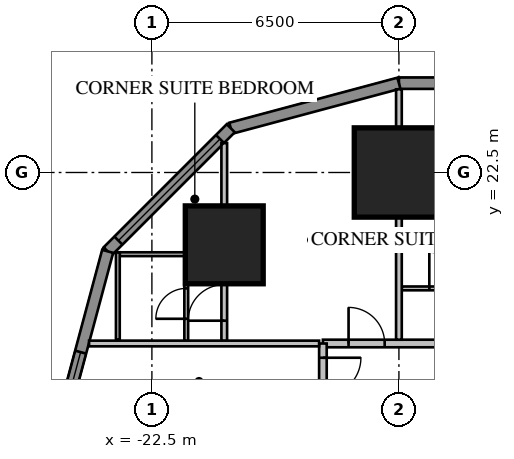
"""IFC4 building model, lengths in metres.
Left out: names, types, materials, properties, quantities, classifications, styles, units other than length and angle.
Written with IfcOpenShell. Run it as: python <this file> out.ifc"""

import sys

from ifc_helpers import new_model, si_unit, direction, frame, frame_2d, origin, origin_2d, place, context, subcontext, project, spatial, rectangle, extrude, element, fill, save


model = new_model("IFC4")
c1 = context("Model", 3, precision=1e-05, world=origin(), true_north=direction((0.0, 1.0)))
c2 = subcontext(c1, "Body", "Model", "MODEL_VIEW")
j1 = project(units=[si_unit("LENGTHUNIT", "METRE"), si_unit("PLANEANGLEUNIT", "RADIAN")], contexts=[c1])
p1 = place(None, origin())
s1 = spatial("IfcSite", under=j1, at=p1, CompositionType="ELEMENT")
p2 = place(p1, origin())
s2 = spatial("IfcBuilding", under=s1, at=p2, CompositionType="ELEMENT")
p3 = place(p2, frame((0.0, 0.0, 31.4)))
s3 = spatial("IfcBuildingStorey", under=s2, at=p3, CompositionType="ELEMENT", Elevation=31.4)
p4 = place(p3, frame((-16.0, 22.5, 0.0), z_axis=(0.0, 0.0, 1.0), x_axis=(1.0, 0.0, 0.0)))
e1 = element("IfcColumn", 1, at=p4, inside=s3, PredefinedType="COLUMN", context=c2, shape_type="SweptSolid", body=[
    extrude(rectangle(XDim=2.35, YDim=2.35, at=origin_2d()), origin(), (0.0, 0.0, 1.0), 3.85),
])
p5 = place(p3, frame((-20.596, 20.596, 0.0), z_axis=(0.0, 0.0, 1.0), x_axis=(1.0, 0.0, 0.0)))
e2 = element("IfcColumn", 2, at=p5, inside=s3, PredefinedType="COLUMN", context=c2, shape_type="SweptSolid", body=[
    extrude(rectangle(XDim=2.05, YDim=2.05, at=origin_2d()), origin(), (0.0, 0.0, 1.0), 3.85),
])
p6 = place(p3, frame((16.0, 24.85, 0.0), z_axis=(0.0, 0.0, 1.0), x_axis=(-1.0, 0.0, 0.0)))
e3 = element("IfcWall", 3, at=p6, inside=s3, PredefinedType="SOLIDWALL", context=c2, shape_type="SweptSolid", body=[
    extrude(rectangle(XDim=32.0, YDim=0.3, at=frame_2d((16.0, 0.0))), origin(), (0.0, 0.0, 1.0), 3.65),
])
p7 = place(p6, frame((1.2, 0.0, 0.75)))
e4 = element("IfcOpeningElement", 4, at=p7, cuts=e3, PredefinedType="OPENING", context=c2, shape_type="SweptSolid", body=[
    extrude(rectangle(XDim=1.6, YDim=1.8, at=frame_2d((0.8, 0.9))), frame((0.0, 0.17, 0.0), z_axis=(0.0, -1.0, 0.0), x_axis=(1.0, 0.0, 0.0)), (0.0, 0.0, 1.0), 0.34),
])
p8 = place(p6, frame((5.2, 0.0, 0.75)))
e5 = element("IfcOpeningElement", 5, at=p8, cuts=e3, PredefinedType="OPENING", context=c2, shape_type="SweptSolid", body=[
    extrude(rectangle(XDim=1.6, YDim=1.8, at=frame_2d((0.8, 0.9))), frame((0.0, 0.17, 0.0), z_axis=(0.0, -1.0, 0.0), x_axis=(1.0, 0.0, 0.0)), (0.0, 0.0, 1.0), 0.34),
])
p9 = place(p6, frame((17.2, 0.0, 0.75)))
e6 = element("IfcOpeningElement", 6, at=p9, cuts=e3, PredefinedType="OPENING", context=c2, shape_type="SweptSolid", body=[
    extrude(rectangle(XDim=1.6, YDim=1.8, at=frame_2d((0.8, 0.9))), frame((0.0, 0.17, 0.0), z_axis=(0.0, -1.0, 0.0), x_axis=(1.0, 0.0, 0.0)), (0.0, 0.0, 1.0), 0.34),
])
p10 = place(p6, frame((21.2, 0.0, 0.75)))
e7 = element("IfcOpeningElement", 7, at=p10, cuts=e3, PredefinedType="OPENING", context=c2, shape_type="SweptSolid", body=[
    extrude(rectangle(XDim=1.6, YDim=1.8, at=frame_2d((0.8, 0.9))), frame((0.0, 0.17, 0.0), z_axis=(0.0, -1.0, 0.0), x_axis=(1.0, 0.0, 0.0)), (0.0, 0.0, 1.0), 0.34),
])
p11 = place(p6, frame((25.2, 0.0, 0.75)))
e8 = element("IfcOpeningElement", 8, at=p11, cuts=e3, PredefinedType="OPENING", context=c2, shape_type="SweptSolid", body=[
    extrude(rectangle(XDim=1.6, YDim=1.8, at=frame_2d((0.8, 0.9))), frame((0.0, 0.17, 0.0), z_axis=(0.0, -1.0, 0.0), x_axis=(1.0, 0.0, 0.0)), (0.0, 0.0, 1.0), 0.34),
])
p12 = place(p6, frame((29.2, 0.0, 0.75)))
e9 = element("IfcOpeningElement", 9, at=p12, cuts=e3, PredefinedType="OPENING", context=c2, shape_type="SweptSolid", body=[
    extrude(rectangle(XDim=1.6, YDim=1.8, at=frame_2d((0.8, 0.9))), frame((0.0, 0.17, 0.0), z_axis=(0.0, -1.0, 0.0), x_axis=(1.0, 0.0, 0.0)), (0.0, 0.0, 1.0), 0.34),
])
p13 = place(p6, frame((8.8, 0.0, 0.75)))
e10 = element("IfcOpeningElement", 10, at=p13, cuts=e3, PredefinedType="OPENING", context=c2, shape_type="SweptSolid", body=[
    extrude(rectangle(XDim=2.4, YDim=1.8, at=frame_2d((1.2, 0.9))), frame((0.0, 0.17, 0.0), z_axis=(0.0, -1.0, 0.0), x_axis=(1.0, 0.0, 0.0)), (0.0, 0.0, 1.0), 0.34),
])
p14 = place(p6, frame((13.812, 0.0, 0.0)))
e11 = element("IfcOpeningElement", 11, at=p14, cuts=e3, PredefinedType="OPENING", context=c2, shape_type="SweptSolid", body=[
    extrude(rectangle(XDim=1.0, YDim=2.4, at=frame_2d((0.5, 1.2))), frame((0.0, 0.17, 0.0), z_axis=(0.0, -1.0, 0.0), x_axis=(1.0, 0.0, 0.0)), (0.0, 0.0, 1.0), 0.34),
])
p15 = place(p3, frame((-16.0, 24.85, 0.0), z_axis=(0.0, 0.0, 1.0), x_axis=(-0.965920218567, -0.258839972501, 0.0)))
e12 = element("IfcWall", 12, at=p15, inside=s3, PredefinedType="SOLIDWALL", context=c2, shape_type="SweptSolid", body=[
    extrude(rectangle(XDim=4.581, YDim=0.3, at=frame_2d((2.291, 0.0))), origin(), (0.0, 0.0, 1.0), 3.65),
])
p16 = place(p3, frame((-20.425, 23.664, 0.0), z_axis=(0.0, 0.0, 1.0), x_axis=(-0.707106781187, -0.707106781187, 0.0)))
e13 = element("IfcWall", 13, at=p16, inside=s3, PredefinedType="SOLIDWALL", context=c2, shape_type="SweptSolid", body=[
    extrude(rectangle(XDim=4.581, YDim=0.3, at=frame_2d((2.291, 0.0))), origin(), (0.0, 0.0, 1.0), 3.65),
])
p17 = place(p16, frame((0.4, 0.0, 0.75)))
e14 = element("IfcOpeningElement", 14, at=p17, cuts=e13, PredefinedType="OPENING", context=c2, shape_type="SweptSolid", body=[
    extrude(rectangle(XDim=3.781, YDim=1.8, at=frame_2d((1.891, 0.9))), frame((0.0, 0.17, 0.0), z_axis=(0.0, -1.0, 0.0), x_axis=(1.0, 0.0, 0.0)), (0.0, 0.0, 1.0), 0.34),
])
p18 = place(p3, frame((-23.664, 20.425, 0.0), z_axis=(0.0, 0.0, 1.0), x_axis=(-0.258839972501, -0.965920218567, 0.0)))
e15 = element("IfcWall", 15, at=p18, inside=s3, PredefinedType="SOLIDWALL", context=c2, shape_type="SweptSolid", body=[
    extrude(rectangle(XDim=4.581, YDim=0.3, at=frame_2d((2.291, 0.0))), origin(), (0.0, 0.0, 1.0), 3.65),
])
p19 = place(p18, frame((2.746, 0.0, 0.75)))
e16 = element("IfcOpeningElement", 16, at=p19, cuts=e15, PredefinedType="OPENING", context=c2, shape_type="SweptSolid", body=[
    extrude(rectangle(XDim=1.6, YDim=1.8, at=frame_2d((0.8, 0.9))), frame((0.0, 0.17, 0.0), z_axis=(0.0, -1.0, 0.0), x_axis=(1.0, 0.0, 0.0)), (0.0, 0.0, 1.0), 0.34),
])
p20 = place(p3, frame((18.0, 18.0, 0.0), z_axis=(0.0, 0.0, 1.0), x_axis=(-1.0, 0.0, 0.0)))
e17 = element("IfcWall", 17, at=p20, inside=s3, PredefinedType="PARTITIONING", context=c2, shape_type="SweptSolid", body=[
    extrude(rectangle(XDim=36.0, YDim=0.2, at=frame_2d((18.0, 0.0))), origin(), (0.0, 0.0, 1.0), 3.65),
])
p21 = place(p20, frame((10.4, 0.0, 0.0)))
e18 = element("IfcOpeningElement", 18, at=p21, cuts=e17, PredefinedType="OPENING", context=c2, shape_type="SweptSolid", body=[
    extrude(rectangle(XDim=1.0, YDim=2.1, at=frame_2d((0.5, 1.05))), frame((0.0, 0.12, 0.0), z_axis=(0.0, -1.0, 0.0), x_axis=(1.0, 0.0, 0.0)), (0.0, 0.0, 1.0), 0.24),
])
p22 = place(p20, frame((0.375, 0.0, 0.0)))
e19 = element("IfcOpeningElement", 19, at=p22, cuts=e17, PredefinedType="OPENING", context=c2, shape_type="SweptSolid", body=[
    extrude(rectangle(XDim=1.0, YDim=2.1, at=frame_2d((0.5, 1.05))), frame((0.0, 0.12, 0.0), z_axis=(0.0, -1.0, 0.0), x_axis=(1.0, 0.0, 0.0)), (0.0, 0.0, 1.0), 0.24),
])
p23 = place(p20, frame((34.375, 0.0, 0.0)))
e20 = element("IfcOpeningElement", 20, at=p23, cuts=e17, PredefinedType="OPENING", context=c2, shape_type="SweptSolid", body=[
    extrude(rectangle(XDim=0.95, YDim=2.1, at=frame_2d((0.475, 1.05))), frame((0.0, 0.12, 0.0), z_axis=(0.0, -1.0, 0.0), x_axis=(1.0, 0.0, 0.0)), (0.0, 0.0, 1.0), 0.24),
])
p24 = place(p3, frame((15.925, 19.45, 0.0), z_axis=(0.0, 0.0, 1.0), x_axis=(-1.0, 0.0, 0.0)))
e21 = element("IfcWall", 21, at=p24, inside=s3, PredefinedType="PARTITIONING", context=c2, shape_type="SweptSolid", body=[
    extrude(rectangle(XDim=31.85, YDim=0.1, at=frame_2d((15.925, 0.0))), origin(), (0.0, 0.0, 1.0), 3.65),
])
p25 = place(p24, frame((10.125, 0.0, 0.0)))
e22 = element("IfcOpeningElement", 22, at=p25, cuts=e21, PredefinedType="OPENING", context=c2, shape_type="SweptSolid", body=[
    extrude(rectangle(XDim=1.0, YDim=2.1, at=frame_2d((0.5, 1.05))), frame((0.0, 0.07, 0.0), z_axis=(0.0, -1.0, 0.0), x_axis=(1.0, 0.0, 0.0)), (0.0, 0.0, 1.0), 0.14),
])
p26 = place(p24, frame((8.3, 0.0, 0.0)))
e23 = element("IfcOpeningElement", 23, at=p26, cuts=e21, PredefinedType="OPENING", context=c2, shape_type="SweptSolid", body=[
    extrude(rectangle(XDim=0.8, YDim=2.1, at=frame_2d((0.4, 1.05))), frame((0.0, 0.07, 0.0), z_axis=(0.0, -1.0, 0.0), x_axis=(1.0, 0.0, 0.0)), (0.0, 0.0, 1.0), 0.14),
])
p27 = place(p24, frame((0.3, 0.0, 0.0)))
e24 = element("IfcOpeningElement", 24, at=p27, cuts=e21, PredefinedType="OPENING", context=c2, shape_type="SweptSolid", body=[
    extrude(rectangle(XDim=0.95, YDim=2.1, at=frame_2d((0.475, 1.05))), frame((0.0, 0.07, 0.0), z_axis=(0.0, -1.0, 0.0), x_axis=(1.0, 0.0, 0.0)), (0.0, 0.0, 1.0), 0.14),
])
p28 = place(p24, frame((6.175, 0.0, 0.0)))
e25 = element("IfcOpeningElement", 25, at=p28, cuts=e21, PredefinedType="OPENING", context=c2, shape_type="SweptSolid", body=[
    extrude(rectangle(XDim=0.95, YDim=2.1, at=frame_2d((0.475, 1.05))), frame((0.0, 0.07, 0.0), z_axis=(0.0, -1.0, 0.0), x_axis=(1.0, 0.0, 0.0)), (0.0, 0.0, 1.0), 0.14),
])
p29 = place(p24, frame((16.3, 0.0, 0.0)))
e26 = element("IfcOpeningElement", 26, at=p29, cuts=e21, PredefinedType="OPENING", context=c2, shape_type="SweptSolid", body=[
    extrude(rectangle(XDim=0.95, YDim=2.1, at=frame_2d((0.475, 1.05))), frame((0.0, 0.07, 0.0), z_axis=(0.0, -1.0, 0.0), x_axis=(1.0, 0.0, 0.0)), (0.0, 0.0, 1.0), 0.14),
])
p30 = place(p24, frame((22.175, 0.0, 0.0)))
e27 = element("IfcOpeningElement", 27, at=p30, cuts=e21, PredefinedType="OPENING", context=c2, shape_type="SweptSolid", body=[
    extrude(rectangle(XDim=0.95, YDim=2.1, at=frame_2d((0.475, 1.05))), frame((0.0, 0.07, 0.0), z_axis=(0.0, -1.0, 0.0), x_axis=(1.0, 0.0, 0.0)), (0.0, 0.0, 1.0), 0.14),
])
p31 = place(p24, frame((24.3, 0.0, 0.0)))
e28 = element("IfcOpeningElement", 28, at=p31, cuts=e21, PredefinedType="OPENING", context=c2, shape_type="SweptSolid", body=[
    extrude(rectangle(XDim=0.95, YDim=2.1, at=frame_2d((0.475, 1.05))), frame((0.0, 0.07, 0.0), z_axis=(0.0, -1.0, 0.0), x_axis=(1.0, 0.0, 0.0)), (0.0, 0.0, 1.0), 0.14),
])
p32 = place(p24, frame((30.175, 0.0, 0.0)))
e29 = element("IfcOpeningElement", 29, at=p32, cuts=e21, PredefinedType="OPENING", context=c2, shape_type="SweptSolid", body=[
    extrude(rectangle(XDim=0.95, YDim=2.1, at=frame_2d((0.475, 1.05))), frame((0.0, 0.07, 0.0), z_axis=(0.0, -1.0, 0.0), x_axis=(1.0, 0.0, 0.0)), (0.0, 0.0, 1.0), 0.14),
])
p33 = place(p3, frame((-16.0, 18.1, 0.0), z_axis=(0.0, 0.0, 1.0), x_axis=(0.0, 1.0, 0.0)))
e30 = element("IfcWall", 30, at=p33, inside=s3, PredefinedType="PARTITIONING", context=c2, shape_type="SweptSolid", body=[
    extrude(rectangle(XDim=6.589, YDim=0.15, at=frame_2d((3.295, 0.0))), origin(), (0.0, 0.0, 1.0), 3.65),
])
p34 = place(p3, frame((-21.596, 18.065, 0.0), z_axis=(0.0, 0.0, 1.0), x_axis=(0.0, 1.0, 0.0)))
e31 = element("IfcWall", 31, at=p34, inside=s3, PredefinedType="PARTITIONING", context=c2, shape_type="SweptSolid", body=[
    extrude(rectangle(XDim=2.335, YDim=0.1, at=frame_2d((1.167, 0.0))), origin(), (0.0, 0.0, 1.0), 3.65),
])
p35 = place(p34, frame((0.585, 0.0, 0.0)))
e32 = element("IfcOpeningElement", 32, at=p35, cuts=e31, PredefinedType="OPENING", context=c2, shape_type="SweptSolid", body=[
    extrude(rectangle(XDim=0.8, YDim=2.1, at=frame_2d((0.4, 1.05))), frame((0.0, 0.07, 0.0), z_axis=(0.0, -1.0, 0.0), x_axis=(1.0, 0.0, 0.0)), (0.0, 0.0, 1.0), 0.14),
])
p36 = place(p3, frame((-21.646, 20.35, 0.0), z_axis=(0.0, 0.0, 1.0), x_axis=(-1.0, 0.0, 0.0)))
e33 = element("IfcWall", 33, at=p36, inside=s3, PredefinedType="PARTITIONING", context=c2, shape_type="SweptSolid", body=[
    extrude(rectangle(XDim=1.7, YDim=0.1, at=frame_2d((0.85, 0.0))), origin(), (0.0, 0.0, 1.0), 3.65),
])
p37 = place(p3, frame((-23.396, 18.1, 0.0), z_axis=(0.0, 0.0, 1.0), x_axis=(0.0, 1.0, 0.0)))
e34 = element("IfcWall", 34, at=p37, inside=s3, PredefinedType="PARTITIONING", context=c2, shape_type="SweptSolid", body=[
    extrude(rectangle(XDim=2.3, YDim=0.1, at=frame_2d((1.15, 0.0))), origin(), (0.0, 0.0, 1.0), 3.65),
])
p38 = place(p3, frame((-20.596, 18.065, 0.0), z_axis=(0.0, 0.0, 1.0), x_axis=(0.0, 1.0, 0.0)))
e35 = element("IfcWall", 35, at=p38, inside=s3, PredefinedType="PARTITIONING", context=c2, shape_type="SweptSolid", body=[
    extrude(rectangle(XDim=5.209, YDim=0.15, at=frame_2d((2.604, 0.0))), origin(), (0.0, 0.0, 1.0), 3.65),
])
p39 = place(p38, frame((0.535, 0.0, 0.0)))
e36 = element("IfcOpeningElement", 36, at=p39, cuts=e35, PredefinedType="OPENING", context=c2, shape_type="SweptSolid", body=[
    extrude(rectangle(XDim=0.95, YDim=2.1, at=frame_2d((0.475, 1.05))), frame((0.0, 0.095, 0.0), z_axis=(0.0, -1.0, 0.0), x_axis=(1.0, 0.0, 0.0)), (0.0, 0.0, 1.0), 0.19),
])
p40 = place(p3, frame((-18.0, 18.0, 0.0), z_axis=(0.0, 0.0, 1.0), x_axis=(0.0, -1.0, 0.0)))
e37 = element("IfcWall", 37, at=p40, inside=s3, PredefinedType="PARTITIONING", context=c2, shape_type="SweptSolid", body=[
    extrude(rectangle(XDim=36.0, YDim=0.2, at=frame_2d((18.0, 0.0))), origin(), (0.0, 0.0, 1.0), 3.65),
])
p41 = place(p40, frame((10.4, 0.0, 0.0)))
e38 = element("IfcOpeningElement", 38, at=p41, cuts=e37, PredefinedType="OPENING", context=c2, shape_type="SweptSolid", body=[
    extrude(rectangle(XDim=1.0, YDim=2.1, at=frame_2d((0.5, 1.05))), frame((0.0, 0.12, 0.0), z_axis=(0.0, -1.0, 0.0), x_axis=(1.0, 0.0, 0.0)), (0.0, 0.0, 1.0), 0.24),
])
p42 = place(p40, frame((0.375, 0.0, 0.0)))
e39 = element("IfcOpeningElement", 39, at=p42, cuts=e37, PredefinedType="OPENING", context=c2, shape_type="SweptSolid", body=[
    extrude(rectangle(XDim=1.0, YDim=2.1, at=frame_2d((0.5, 1.05))), frame((0.0, 0.12, 0.0), z_axis=(0.0, -1.0, 0.0), x_axis=(1.0, 0.0, 0.0)), (0.0, 0.0, 1.0), 0.24),
])
p43 = place(p40, frame((34.375, 0.0, 0.0)))
e40 = element("IfcOpeningElement", 40, at=p43, cuts=e37, PredefinedType="OPENING", context=c2, shape_type="SweptSolid", body=[
    extrude(rectangle(XDim=0.95, YDim=2.1, at=frame_2d((0.475, 1.05))), frame((0.0, 0.12, 0.0), z_axis=(0.0, -1.0, 0.0), x_axis=(1.0, 0.0, 0.0)), (0.0, 0.0, 1.0), 0.24),
])
p44 = place(p3, frame((-18.1, 18.0, 0.0), z_axis=(0.0, 0.0, 1.0), x_axis=(-1.0, 0.0, 0.0)))
e41 = element("IfcWall", 41, at=p44, inside=s3, PredefinedType="PARTITIONING", context=c2, shape_type="SweptSolid", body=[
    extrude(rectangle(XDim=6.053, YDim=0.15, at=frame_2d((3.027, 0.0))), origin(), (0.0, 0.0, 1.0), 3.65),
])
p45 = place(p17, origin())
e42 = element("IfcWindow", 42, at=p45, inside=s3, PartitioningType="SINGLE_PANEL", PredefinedType="WINDOW", context=c2, shape_type="SweptSolid", body=[
    extrude(rectangle(XDim=3.781, YDim=1.8, at=frame_2d((1.891, 0.9))), frame((0.0, 0.03, 0.0), z_axis=(0.0, -1.0, 0.0), x_axis=(1.0, 0.0, 0.0)), (0.0, 0.0, 1.0), 0.06),
])
fill(e14, e42)
p46 = place(p19, origin())
e43 = element("IfcWindow", 43, at=p46, inside=s3, PartitioningType="SINGLE_PANEL", PredefinedType="WINDOW", context=c2, shape_type="SweptSolid", body=[
    extrude(rectangle(XDim=1.6, YDim=1.8, at=frame_2d((0.8, 0.9))), frame((0.0, 0.03, 0.0), z_axis=(0.0, -1.0, 0.0), x_axis=(1.0, 0.0, 0.0)), (0.0, 0.0, 1.0), 0.06),
])
fill(e16, e43)
p47 = place(p32, origin())
e44 = element("IfcDoor", 44, at=p47, inside=s3, OperationType="SINGLE_SWING_RIGHT", PredefinedType="DOOR", context=c2, shape_type="SweptSolid", body=[
    extrude(rectangle(XDim=0.95, YDim=2.1, at=frame_2d((0.475, 1.05))), frame((0.0, 0.025, 0.0), z_axis=(0.0, -1.0, 0.0), x_axis=(1.0, 0.0, 0.0)), (0.0, 0.0, 1.0), 0.05),
])
fill(e29, e44)
p48 = place(p23, origin())
e45 = element("IfcDoor", 45, at=p48, inside=s3, OperationType="SINGLE_SWING_RIGHT", PredefinedType="DOOR", context=c2, shape_type="SweptSolid", body=[
    extrude(rectangle(XDim=0.95, YDim=2.1, at=frame_2d((0.475, 1.05))), frame((0.0, 0.025, 0.0), z_axis=(0.0, -1.0, 0.0), x_axis=(1.0, 0.0, 0.0)), (0.0, 0.0, 1.0), 0.05),
])
fill(e20, e45)
p49 = place(p35, origin())
e46 = element("IfcDoor", 46, at=p49, inside=s3, OperationType="SINGLE_SWING_LEFT", PredefinedType="DOOR", context=c2, shape_type="SweptSolid", body=[
    extrude(rectangle(XDim=0.8, YDim=2.1, at=frame_2d((0.4, 1.05))), frame((0.0, 0.025, 0.0), z_axis=(0.0, -1.0, 0.0), x_axis=(1.0, 0.0, 0.0)), (0.0, 0.0, 1.0), 0.05),
])
fill(e32, e46)
p50 = place(p39, origin())
e47 = element("IfcDoor", 47, at=p50, inside=s3, OperationType="SINGLE_SWING_LEFT", PredefinedType="DOOR", context=c2, shape_type="SweptSolid", body=[
    extrude(rectangle(XDim=0.95, YDim=2.1, at=frame_2d((0.475, 1.05))), frame((0.0, 0.025, 0.0), z_axis=(0.0, -1.0, 0.0), x_axis=(1.0, 0.0, 0.0)), (0.0, 0.0, 1.0), 0.05),
])
fill(e36, e47)
p51 = place(p42, origin())
e48 = element("IfcDoor", 48, at=p51, inside=s3, OperationType="SINGLE_SWING_LEFT", PredefinedType="DOOR", context=c2, shape_type="SweptSolid", body=[
    extrude(rectangle(XDim=1.0, YDim=2.1, at=frame_2d((0.5, 1.05))), frame((0.0, 0.025, 0.0), z_axis=(0.0, -1.0, 0.0), x_axis=(1.0, 0.0, 0.0)), (0.0, 0.0, 1.0), 0.05),
])
fill(e39, e48)
save(model, sys.argv[1])
